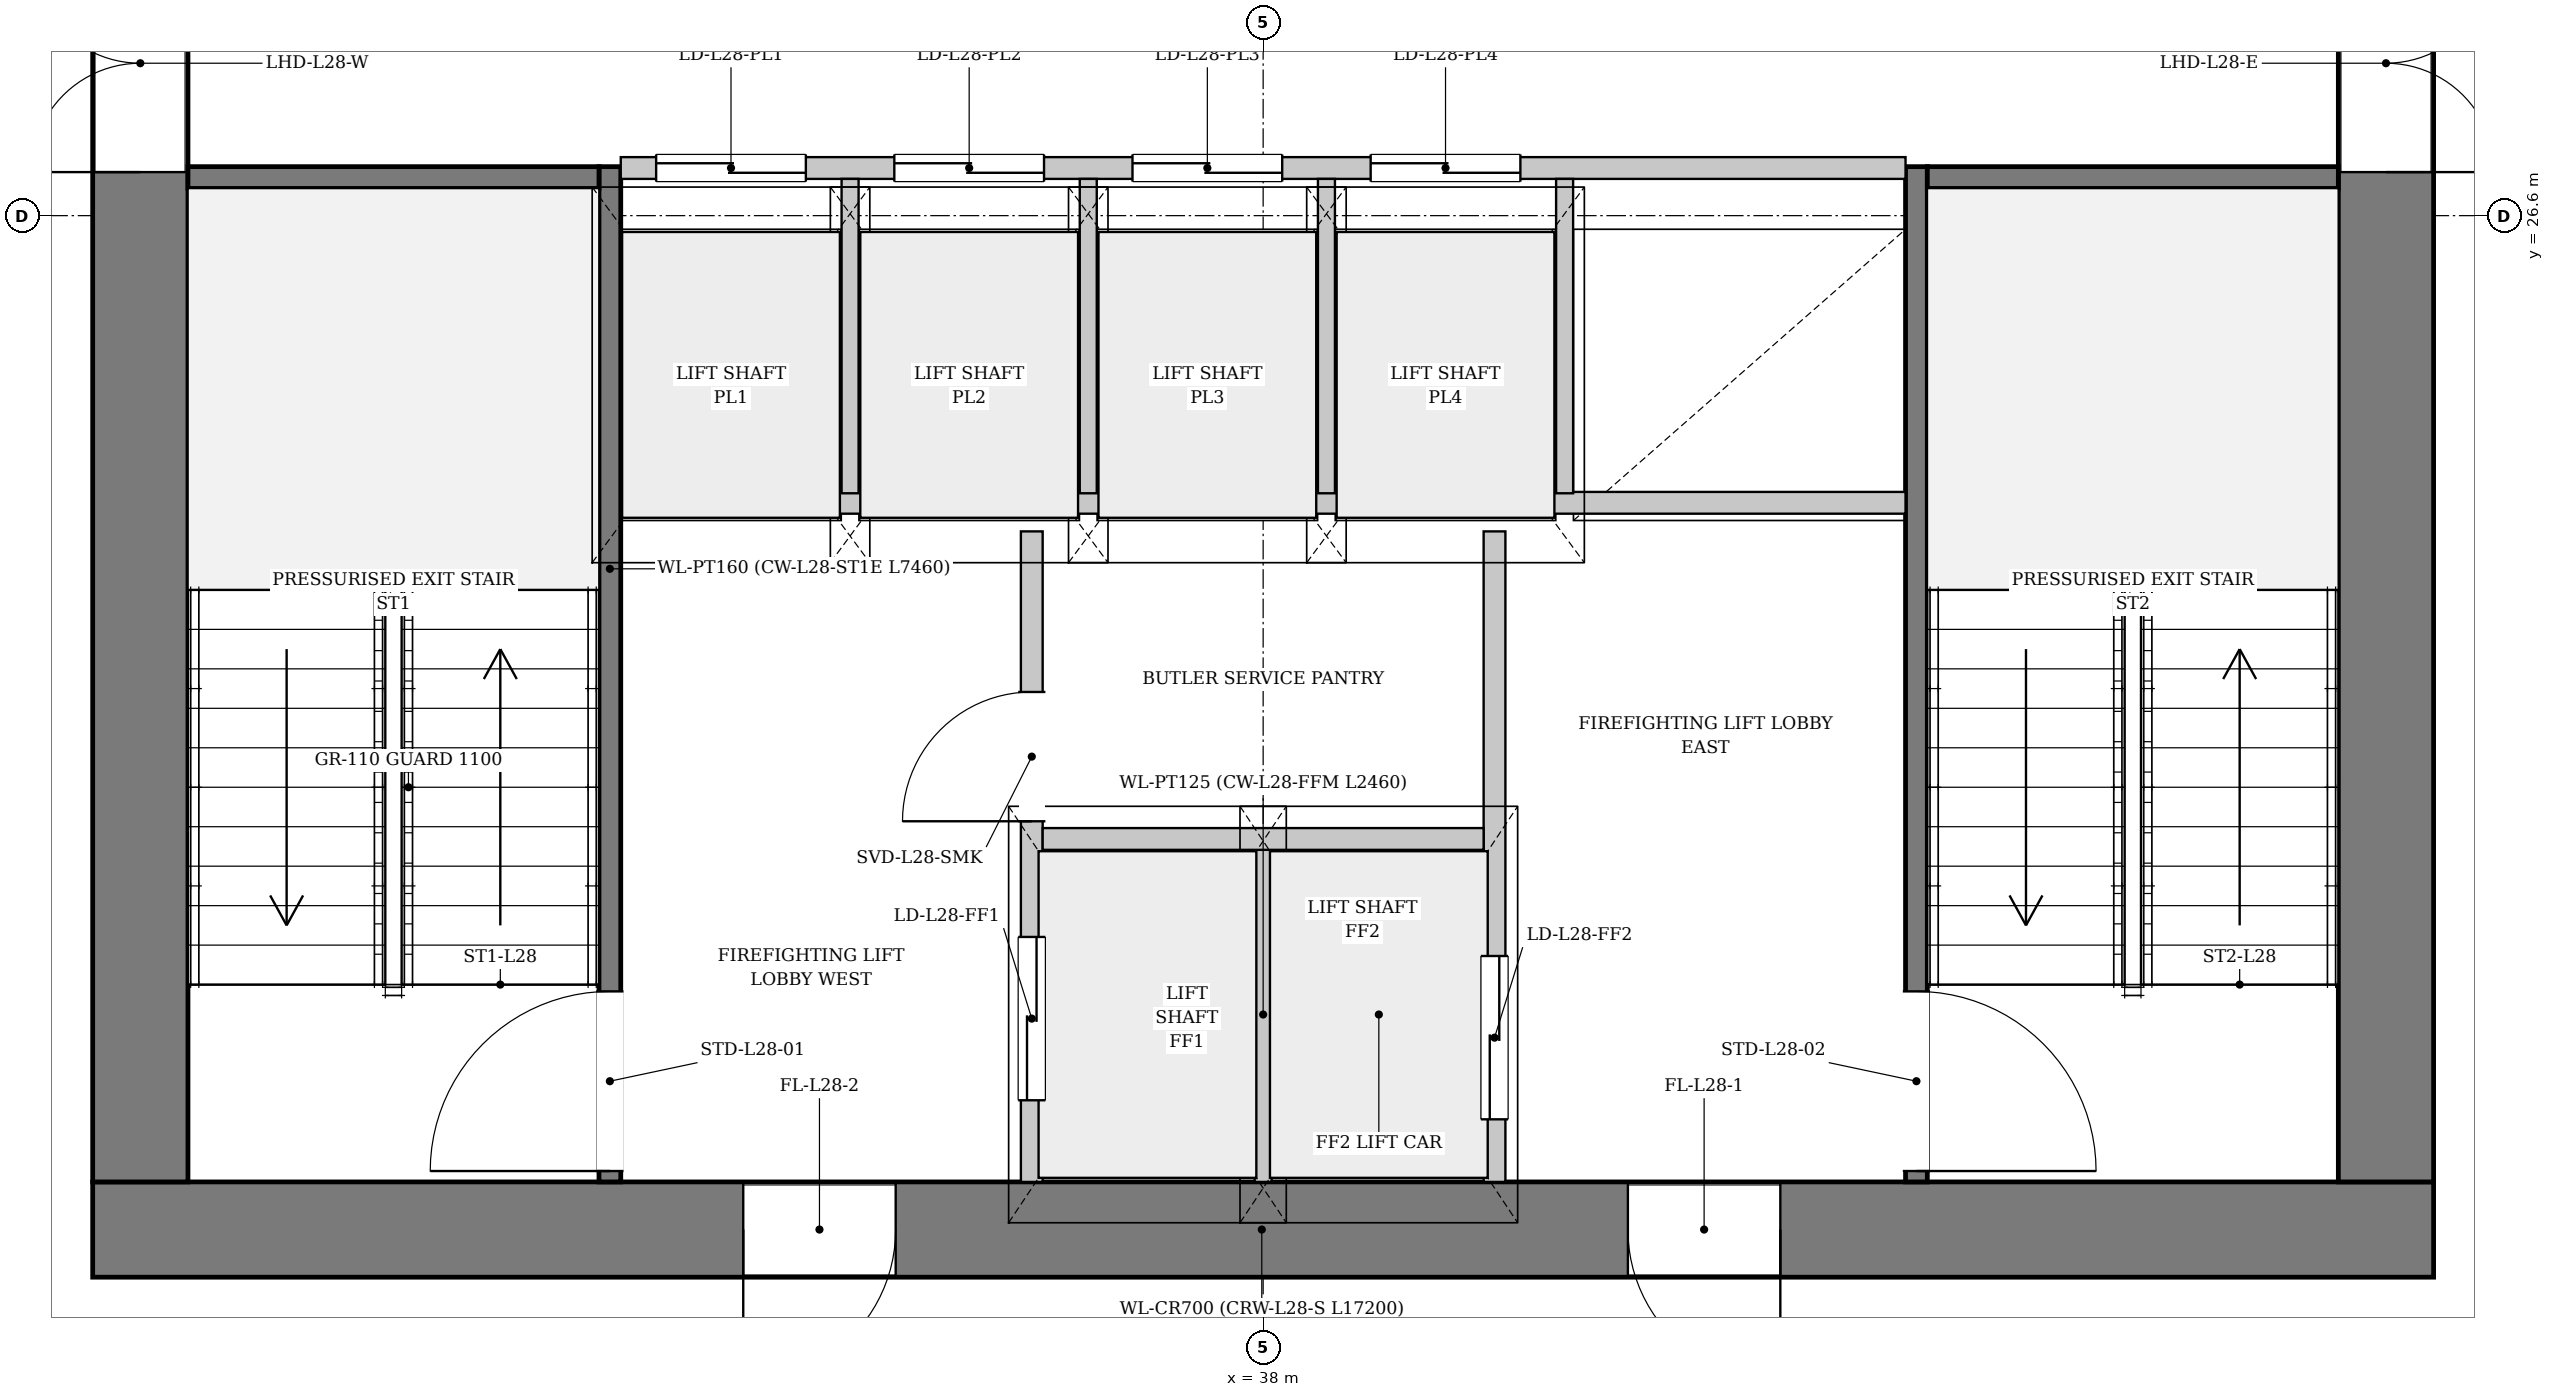
"""IFC4 building model, lengths in metres.
Left out: names, types, materials, properties, quantities, classifications, styles, units other than length and angle.
Written with IfcOpenShell. Run it as: python <this file> out.ifc"""

import sys

from ifc_helpers import new_model, si_unit, direction, frame, frame_2d, origin, place, context, subcontext, project, spatial, rectangle, extrude, source, transform, mapped, element, fill, save


model = new_model("IFC4")
c1 = context("Model", 3, precision=1e-05, world=origin(), true_north=direction((0.0, 1.0)))
c2 = subcontext(c1, "Body", "Model", "MODEL_VIEW")
j1 = project(units=[si_unit("LENGTHUNIT", "METRE"), si_unit("PLANEANGLEUNIT", "RADIAN")], contexts=[c1])
p1 = place(None, origin())
s1 = spatial("IfcSite", under=j1, at=p1, CompositionType="ELEMENT")
p2 = place(p1, origin())
s2 = spatial("IfcBuilding", under=s1, at=p2, CompositionType="ELEMENT")
p3 = place(p2, frame((0.0, 0.0, 109.25)))
s3 = spatial("IfcBuildingStorey", under=s2, at=p3, CompositionType="ELEMENT", Elevation=109.25)
p4 = place(p3, frame((46.6, 19.15, 0.0), z_axis=(0.0, 0.0, 1.0), x_axis=(-1.0, 0.0, 0.0)))
e1 = element("IfcWall", 1, at=p4, inside=s3, PredefinedType="SHEAR", context=c2, shape_type="SweptSolid", body=[
    extrude(rectangle(XDim=17.2, YDim=0.7, at=frame_2d((8.6, 0.0))), origin(), (0.0, 0.0, 1.0), 3.3),
])
p5 = place(p4, frame((4.8, 0.0, 0.0)))
e2 = element("IfcOpeningElement", 2, at=p5, cuts=e1, PredefinedType="OPENING", context=c2, shape_type="SweptSolid", body=[
    extrude(rectangle(XDim=1.12, YDim=2.25, at=frame_2d((0.56, 1.125))), frame((0.0, 0.36, 0.0), z_axis=(0.0, -1.0, 0.0), x_axis=(1.0, 0.0, 0.0)), (0.0, 0.0, 1.0), 0.72),
])
p6 = place(p4, frame((11.3, 0.0, 0.0)))
e3 = element("IfcOpeningElement", 3, at=p6, cuts=e1, PredefinedType="OPENING", context=c2, shape_type="SweptSolid", body=[
    extrude(rectangle(XDim=1.12, YDim=2.25, at=frame_2d((0.56, 1.125))), frame((0.0, 0.36, 0.0), z_axis=(0.0, -1.0, 0.0), x_axis=(1.0, 0.0, 0.0)), (0.0, 0.0, 1.0), 0.72),
])
p7 = place(p3, frame((29.75, 19.5, 0.0), z_axis=(0.0, 0.0, 1.0), x_axis=(0.0, 1.0, 0.0)))
e4 = element("IfcWall", 4, at=p7, inside=s3, PredefinedType="SHEAR", context=c2, shape_type="SweptSolid", body=[
    extrude(rectangle(XDim=14.2, YDim=0.7, at=frame_2d((7.1, 0.0))), origin(), (0.0, 0.0, 1.0), 3.3),
])
p8 = place(p7, frame((7.42, 0.0, 0.0)))
e5 = element("IfcOpeningElement", 5, at=p8, cuts=e4, PredefinedType="OPENING", context=c2, shape_type="SweptSolid", body=[
    extrude(rectangle(XDim=1.6, YDim=2.2, at=frame_2d((0.8, 1.1))), frame((0.0, 0.36, 0.0), z_axis=(0.0, -1.0, 0.0), x_axis=(1.0, 0.0, 0.0)), (0.0, 0.0, 1.0), 0.72),
])
p9 = place(p3, frame((46.25, 33.7, 0.0), z_axis=(0.0, 0.0, 1.0), x_axis=(0.0, -1.0, 0.0)))
e6 = element("IfcWall", 6, at=p9, inside=s3, PredefinedType="SHEAR", context=c2, shape_type="SweptSolid", body=[
    extrude(rectangle(XDim=14.2, YDim=0.7, at=frame_2d((7.1, 0.0))), origin(), (0.0, 0.0, 1.0), 3.3),
])
p10 = place(p9, frame((5.18, 0.0, 0.0)))
e7 = element("IfcOpeningElement", 7, at=p10, cuts=e6, PredefinedType="OPENING", context=c2, shape_type="SweptSolid", body=[
    extrude(rectangle(XDim=1.6, YDim=2.2, at=frame_2d((0.8, 1.1))), frame((0.0, 0.36, 0.0), z_axis=(0.0, -1.0, 0.0), x_axis=(1.0, 0.0, 0.0)), (0.0, 0.0, 1.0), 0.72),
])
p11 = place(p3, frame((33.2, 19.5, 0.0), z_axis=(0.0, 0.0, 1.0), x_axis=(0.0, 1.0, 0.0)))
e8 = element("IfcWall", 8, at=p11, inside=s3, PredefinedType="PARTITIONING", context=c2, shape_type="SweptSolid", body=[
    extrude(rectangle(XDim=7.46, YDim=0.16, at=frame_2d((3.73, 0.0))), origin(), (0.0, 0.0, 1.0), 3.3),
])
p12 = place(p11, frame((0.08, 0.0, 0.0)))
e9 = element("IfcOpeningElement", 9, at=p12, cuts=e8, PredefinedType="OPENING", context=c2, shape_type="SweptSolid", body=[
    extrude(rectangle(XDim=1.32, YDim=2.2, at=frame_2d((0.66, 1.1))), frame((0.0, 0.09, 0.0), z_axis=(0.0, -1.0, 0.0), x_axis=(1.0, 0.0, 0.0)), (0.0, 0.0, 1.0), 0.18),
])
p13 = place(p3, frame((30.1, 26.88, 0.0), z_axis=(0.0, 0.0, 1.0), x_axis=(1.0, 0.0, 0.0)))
e10 = element("IfcWall", 10, at=p13, inside=s3, PredefinedType="PARTITIONING", context=c2, shape_type="SweptSolid", body=[
    extrude(rectangle(XDim=3.02, YDim=0.16, at=frame_2d((1.51, 0.0))), origin(), (0.0, 0.0, 1.0), 3.3),
])
p14 = place(p3, frame((42.8, 26.96, 0.0), z_axis=(0.0, 0.0, 1.0), x_axis=(0.0, -1.0, 0.0)))
e11 = element("IfcWall", 11, at=p14, inside=s3, PredefinedType="PARTITIONING", context=c2, shape_type="SweptSolid", body=[
    extrude(rectangle(XDim=7.46, YDim=0.16, at=frame_2d((3.73, 0.0))), origin(), (0.0, 0.0, 1.0), 3.3),
])
p15 = place(p14, frame((6.06, 0.0, 0.0)))
e12 = element("IfcOpeningElement", 12, at=p15, cuts=e11, PredefinedType="OPENING", context=c2, shape_type="SweptSolid", body=[
    extrude(rectangle(XDim=1.32, YDim=2.2, at=frame_2d((0.66, 1.1))), frame((0.0, 0.09, 0.0), z_axis=(0.0, -1.0, 0.0), x_axis=(1.0, 0.0, 0.0)), (0.0, 0.0, 1.0), 0.18),
])
p16 = place(p3, frame((42.88, 26.88, 0.0), z_axis=(0.0, 0.0, 1.0), x_axis=(1.0, 0.0, 0.0)))
e13 = element("IfcWall", 13, at=p16, inside=s3, PredefinedType="PARTITIONING", context=c2, shape_type="SweptSolid", body=[
    extrude(rectangle(XDim=3.02, YDim=0.16, at=frame_2d((1.51, 0.0))), origin(), (0.0, 0.0, 1.0), 3.3),
])
p17 = place(p3, frame((36.3, 19.5, 0.0), z_axis=(0.0, 0.0, 1.0), x_axis=(0.0, 1.0, 0.0)))
e14 = element("IfcWall", 14, at=p17, inside=s3, PredefinedType="PARTITIONING", context=c2, shape_type="SweptSolid", body=[
    extrude(rectangle(XDim=4.78, YDim=0.16, at=frame_2d((2.39, 0.0))), origin(), (0.0, 0.0, 1.0), 3.3),
])
p18 = place(p17, frame((0.6, 0.0, 0.0)))
e15 = element("IfcOpeningElement", 15, at=p18, cuts=e14, PredefinedType="OPENING", context=c2, shape_type="SweptSolid", body=[
    extrude(rectangle(XDim=1.2, YDim=2.2, at=frame_2d((0.6, 1.1))), frame((0.0, 0.09, 0.0), z_axis=(0.0, -1.0, 0.0), x_axis=(1.0, 0.0, 0.0)), (0.0, 0.0, 1.0), 0.18),
])
p19 = place(p17, frame((2.65, 0.0, 0.0)))
e16 = element("IfcOpeningElement", 16, at=p19, cuts=e14, PredefinedType="OPENING", context=c2, shape_type="SweptSolid", body=[
    extrude(rectangle(XDim=0.95, YDim=2.1, at=frame_2d((0.475, 1.05))), frame((0.0, 0.09, 0.0), z_axis=(0.0, -1.0, 0.0), x_axis=(1.0, 0.0, 0.0)), (0.0, 0.0, 1.0), 0.18),
])
p20 = place(p3, frame((39.7, 24.28, 0.0), z_axis=(0.0, 0.0, 1.0), x_axis=(0.0, -1.0, 0.0)))
e17 = element("IfcWall", 17, at=p20, inside=s3, PredefinedType="PARTITIONING", context=c2, shape_type="SweptSolid", body=[
    extrude(rectangle(XDim=4.78, YDim=0.16, at=frame_2d((2.39, 0.0))), origin(), (0.0, 0.0, 1.0), 3.3),
])
p21 = place(p20, frame((3.12, 0.0, 0.0)))
e18 = element("IfcOpeningElement", 18, at=p21, cuts=e17, PredefinedType="OPENING", context=c2, shape_type="SweptSolid", body=[
    extrude(rectangle(XDim=1.2, YDim=2.2, at=frame_2d((0.6, 1.1))), frame((0.0, 0.09, 0.0), z_axis=(0.0, -1.0, 0.0), x_axis=(1.0, 0.0, 0.0)), (0.0, 0.0, 1.0), 0.18),
])
p22 = place(p3, frame((38.0, 19.5, 0.0), z_axis=(0.0, 0.0, 1.0), x_axis=(0.0, 1.0, 0.0)))
e19 = element("IfcWall", 19, at=p22, inside=s3, PredefinedType="PARTITIONING", context=c2, shape_type="SweptSolid", body=[
    extrude(rectangle(XDim=2.46, YDim=0.125, at=frame_2d((1.23, 0.0))), origin(), (0.0, 0.0, 1.0), 3.3),
])
p23 = place(p3, frame((36.38, 22.02, 0.0), z_axis=(0.0, 0.0, 1.0), x_axis=(1.0, 0.0, 0.0)))
e20 = element("IfcWall", 20, at=p23, inside=s3, PredefinedType="PARTITIONING", context=c2, shape_type="SweptSolid", body=[
    extrude(rectangle(XDim=3.24, YDim=0.16, at=frame_2d((1.62, 0.0))), origin(), (0.0, 0.0, 1.0), 3.3),
])
p24 = place(p3, frame((33.28, 24.49, 0.0), z_axis=(0.0, 0.0, 1.0), x_axis=(1.0, 0.0, 0.0)))
e21 = element("IfcWall", 21, at=p24, inside=s3, PredefinedType="PARTITIONING", context=c2, shape_type="SweptSolid", body=[
    extrude(rectangle(XDim=9.44, YDim=0.16, at=frame_2d((4.72, 0.0))), origin(), (0.0, 0.0, 1.0), 3.3),
])
p25 = place(p3, frame((33.28, 26.95, 0.0), z_axis=(0.0, 0.0, 1.0), x_axis=(1.0, 0.0, 0.0)))
e22 = element("IfcWall", 22, at=p25, inside=s3, PredefinedType="PARTITIONING", context=c2, shape_type="SweptSolid", body=[
    extrude(rectangle(XDim=9.44, YDim=0.16, at=frame_2d((4.72, 0.0))), origin(), (0.0, 0.0, 1.0), 3.3),
])
p26 = place(p25, frame((0.26, 0.0, 0.0)))
e23 = element("IfcOpeningElement", 23, at=p26, cuts=e22, PredefinedType="OPENING", context=c2, shape_type="SweptSolid", body=[
    extrude(rectangle(XDim=1.1, YDim=2.2, at=frame_2d((0.55, 1.1))), frame((0.0, 0.09, 0.0), z_axis=(0.0, -1.0, 0.0), x_axis=(1.0, 0.0, 0.0)), (0.0, 0.0, 1.0), 0.18),
])
p27 = place(p25, frame((2.01, 0.0, 0.0)))
e24 = element("IfcOpeningElement", 24, at=p27, cuts=e22, PredefinedType="OPENING", context=c2, shape_type="SweptSolid", body=[
    extrude(rectangle(XDim=1.1, YDim=2.2, at=frame_2d((0.55, 1.1))), frame((0.0, 0.09, 0.0), z_axis=(0.0, -1.0, 0.0), x_axis=(1.0, 0.0, 0.0)), (0.0, 0.0, 1.0), 0.18),
])
p28 = place(p25, frame((3.76, 0.0, 0.0)))
e25 = element("IfcOpeningElement", 25, at=p28, cuts=e22, PredefinedType="OPENING", context=c2, shape_type="SweptSolid", body=[
    extrude(rectangle(XDim=1.1, YDim=2.2, at=frame_2d((0.55, 1.1))), frame((0.0, 0.09, 0.0), z_axis=(0.0, -1.0, 0.0), x_axis=(1.0, 0.0, 0.0)), (0.0, 0.0, 1.0), 0.18),
])
p29 = place(p25, frame((5.51, 0.0, 0.0)))
e26 = element("IfcOpeningElement", 26, at=p29, cuts=e22, PredefinedType="OPENING", context=c2, shape_type="SweptSolid", body=[
    extrude(rectangle(XDim=1.1, YDim=2.2, at=frame_2d((0.55, 1.1))), frame((0.0, 0.09, 0.0), z_axis=(0.0, -1.0, 0.0), x_axis=(1.0, 0.0, 0.0)), (0.0, 0.0, 1.0), 0.18),
])
for number, where, z_axis, x_axis in (
    (27, (34.965, 24.56, 0.0), (0.0, 0.0, 1.0), (0.0, 1.0, 0.0)),
    (28, (36.715, 24.56, 0.0), (0.0, 0.0, 1.0), (0.0, 1.0, 0.0)),
    (29, (38.465, 24.56, 0.0), (0.0, 0.0, 1.0), (0.0, 1.0, 0.0)),
    (30, (40.215, 24.56, 0.0), (0.0, 0.0, 1.0), (0.0, 1.0, 0.0)),
):
    element("IfcWall", number, at=place(p3, frame(where, z_axis=z_axis, x_axis=x_axis)), inside=s3, PredefinedType="PARTITIONING", context=c2, shape_type="SweptSolid", body=[
        extrude(rectangle(XDim=2.31, YDim=0.125, at=frame_2d((1.155, 0.0))), origin(), (0.0, 0.0, 1.0), 3.3),
    ])
m1 = source(origin(), c2, "Body", "SweptSolid", [
    extrude(rectangle(XDim=1.12, YDim=2.25, at=frame_2d((0.56, 1.125))), frame((0.0, 0.025, 0.0), z_axis=(0.0, -1.0, 0.0), x_axis=(1.0, 0.0, 0.0)), (0.0, 0.0, 1.0), 0.05),
])
p30 = place(p5, origin())
e31 = element("IfcDoor", 31, at=p30, inside=s3, OperationType="SINGLE_SWING_LEFT", PredefinedType="DOOR", context=c2, shape_type="MappedRepresentation", body=[
    mapped(m1, transform((0.0, 0.0, 0.0), x_axis=(1.0, 0.0, 0.0), y_axis=(0.0, 1.0, 0.0), z_axis=(0.0, 0.0, 1.0), scale=1.0)),
])
fill(e2, e31)
p31 = place(p6, origin())
e32 = element("IfcDoor", 32, at=p31, inside=s3, OperationType="SINGLE_SWING_RIGHT", PredefinedType="DOOR", context=c2, shape_type="MappedRepresentation", body=[
    mapped(m1, transform((0.0, 0.0, 0.0), x_axis=(1.0, 0.0, 0.0), y_axis=(0.0, 1.0, 0.0), z_axis=(0.0, 0.0, 1.0), scale=1.0)),
])
fill(e3, e32)
m2 = source(origin(), c2, "Body", "SweptSolid", [
    extrude(rectangle(XDim=1.6, YDim=2.2, at=frame_2d((0.8, 1.1))), frame((0.0, 0.025, 0.0), z_axis=(0.0, -1.0, 0.0), x_axis=(1.0, 0.0, 0.0)), (0.0, 0.0, 1.0), 0.05),
])
p32 = place(p8, origin())
e33 = element("IfcDoor", 33, at=p32, inside=s3, OperationType="DOUBLE_DOOR_SINGLE_SWING", PredefinedType="DOOR", context=c2, shape_type="MappedRepresentation", body=[
    mapped(m2, transform((0.0, 0.0, 0.0), x_axis=(1.0, 0.0, 0.0), y_axis=(0.0, 1.0, 0.0), z_axis=(0.0, 0.0, 1.0), scale=1.0)),
])
fill(e5, e33)
p33 = place(p10, origin())
e34 = element("IfcDoor", 34, at=p33, inside=s3, OperationType="DOUBLE_DOOR_SINGLE_SWING", PredefinedType="DOOR", context=c2, shape_type="MappedRepresentation", body=[
    mapped(m2, transform((0.0, 0.0, 0.0), x_axis=(1.0, 0.0, 0.0), y_axis=(0.0, 1.0, 0.0), z_axis=(0.0, 0.0, 1.0), scale=1.0)),
])
fill(e7, e34)
m3 = source(origin(), c2, "Body", "SweptSolid", [
    extrude(rectangle(XDim=1.32, YDim=2.2, at=frame_2d((0.66, 1.1))), frame((0.0, 0.025, 0.0), z_axis=(0.0, -1.0, 0.0), x_axis=(1.0, 0.0, 0.0)), (0.0, 0.0, 1.0), 0.05),
])
p34 = place(p12, origin())
e35 = element("IfcDoor", 35, at=p34, inside=s3, OperationType="SINGLE_SWING_LEFT", PredefinedType="DOOR", context=c2, shape_type="MappedRepresentation", body=[
    mapped(m3, transform((0.0, 0.0, 0.0), x_axis=(1.0, 0.0, 0.0), y_axis=(0.0, 1.0, 0.0), z_axis=(0.0, 0.0, 1.0), scale=1.0)),
])
fill(e9, e35)
p35 = place(p15, origin())
e36 = element("IfcDoor", 36, at=p35, inside=s3, OperationType="SINGLE_SWING_RIGHT", PredefinedType="DOOR", context=c2, shape_type="MappedRepresentation", body=[
    mapped(m3, transform((0.0, 0.0, 0.0), x_axis=(1.0, 0.0, 0.0), y_axis=(0.0, 1.0, 0.0), z_axis=(0.0, 0.0, 1.0), scale=1.0)),
])
fill(e12, e36)
m4 = source(origin(), c2, "Body", "SweptSolid", [
    extrude(rectangle(XDim=1.2, YDim=2.2, at=frame_2d((0.6, 1.1))), frame((0.0, 0.025, 0.0), z_axis=(0.0, -1.0, 0.0), x_axis=(1.0, 0.0, 0.0)), (0.0, 0.0, 1.0), 0.05),
])
p36 = place(p18, origin())
e37 = element("IfcDoor", 37, at=p36, inside=s3, OperationType="DOUBLE_DOOR_SLIDING", PredefinedType="DOOR", context=c2, shape_type="MappedRepresentation", body=[
    mapped(m4, transform((0.0, 0.0, 0.0), x_axis=(1.0, 0.0, 0.0), y_axis=(0.0, 1.0, 0.0), z_axis=(0.0, 0.0, 1.0), scale=1.0)),
])
fill(e15, e37)
m5 = source(origin(), c2, "Body", "SweptSolid", [
    extrude(rectangle(XDim=0.95, YDim=2.1, at=frame_2d((0.475, 1.05))), frame((0.0, 0.025, 0.0), z_axis=(0.0, -1.0, 0.0), x_axis=(1.0, 0.0, 0.0)), (0.0, 0.0, 1.0), 0.05),
])
p37 = place(p19, origin())
e38 = element("IfcDoor", 38, at=p37, inside=s3, OperationType="SINGLE_SWING_LEFT", PredefinedType="DOOR", context=c2, shape_type="MappedRepresentation", body=[
    mapped(m5, transform((0.0, 0.0, 0.0), x_axis=(1.0, 0.0, 0.0), y_axis=(0.0, 1.0, 0.0), z_axis=(0.0, 0.0, 1.0), scale=1.0)),
])
fill(e16, e38)
p38 = place(p21, origin())
e39 = element("IfcDoor", 39, at=p38, inside=s3, OperationType="DOUBLE_DOOR_SLIDING", PredefinedType="DOOR", context=c2, shape_type="MappedRepresentation", body=[
    mapped(m4, transform((0.0, 0.0, 0.0), x_axis=(1.0, 0.0, 0.0), y_axis=(0.0, 1.0, 0.0), z_axis=(0.0, 0.0, 1.0), scale=1.0)),
])
fill(e18, e39)
m6 = source(origin(), c2, "Body", "SweptSolid", [
    extrude(rectangle(XDim=1.1, YDim=2.2, at=frame_2d((0.55, 1.1))), frame((0.0, 0.025, 0.0), z_axis=(0.0, -1.0, 0.0), x_axis=(1.0, 0.0, 0.0)), (0.0, 0.0, 1.0), 0.05),
])
p39 = place(p26, origin())
e40 = element("IfcDoor", 40, at=p39, inside=s3, OperationType="DOUBLE_DOOR_SLIDING", PredefinedType="DOOR", context=c2, shape_type="MappedRepresentation", body=[
    mapped(m6, transform((0.0, 0.0, 0.0), x_axis=(1.0, 0.0, 0.0), y_axis=(0.0, 1.0, 0.0), z_axis=(0.0, 0.0, 1.0), scale=1.0)),
])
fill(e23, e40)
p40 = place(p27, origin())
e41 = element("IfcDoor", 41, at=p40, inside=s3, OperationType="DOUBLE_DOOR_SLIDING", PredefinedType="DOOR", context=c2, shape_type="MappedRepresentation", body=[
    mapped(m6, transform((0.0, 0.0, 0.0), x_axis=(1.0, 0.0, 0.0), y_axis=(0.0, 1.0, 0.0), z_axis=(0.0, 0.0, 1.0), scale=1.0)),
])
fill(e24, e41)
p41 = place(p28, origin())
e42 = element("IfcDoor", 42, at=p41, inside=s3, OperationType="DOUBLE_DOOR_SLIDING", PredefinedType="DOOR", context=c2, shape_type="MappedRepresentation", body=[
    mapped(m6, transform((0.0, 0.0, 0.0), x_axis=(1.0, 0.0, 0.0), y_axis=(0.0, 1.0, 0.0), z_axis=(0.0, 0.0, 1.0), scale=1.0)),
])
fill(e25, e42)
p42 = place(p29, origin())
e43 = element("IfcDoor", 43, at=p42, inside=s3, OperationType="DOUBLE_DOOR_SLIDING", PredefinedType="DOOR", context=c2, shape_type="MappedRepresentation", body=[
    mapped(m6, transform((0.0, 0.0, 0.0), x_axis=(1.0, 0.0, 0.0), y_axis=(0.0, 1.0, 0.0), z_axis=(0.0, 0.0, 1.0), scale=1.0)),
])
fill(e26, e43)
save(model, sys.argv[1])
